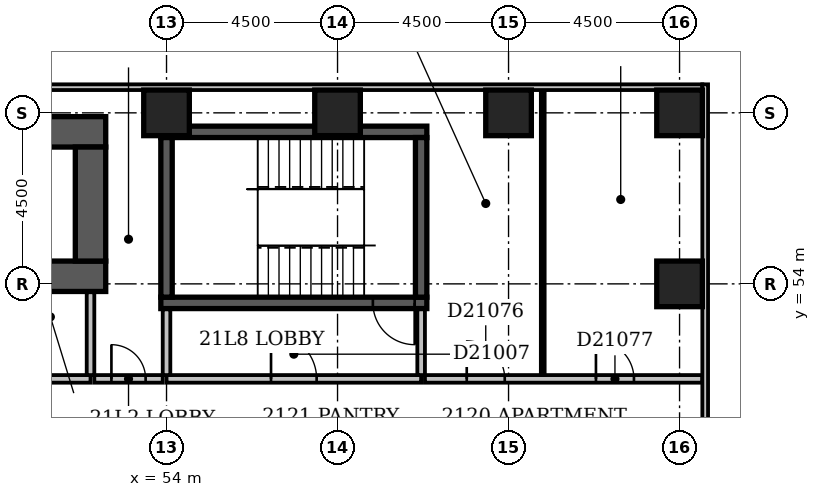
"""IFC4 building model, lengths in metres.
Left out: names, types, materials, properties, quantities, classifications, styles, units other than length and angle.
Written with IfcOpenShell. Run it as: python <this file> out.ifc"""

import sys

from ifc_helpers import new_model, si_unit, direction, frame, frame_2d, origin, origin_2d, place, context, subcontext, project, spatial, rectangle, extrude, element, fill, save


model = new_model("IFC4")
c1 = context("Model", 3, precision=1e-05, world=origin(), true_north=direction((0.0, 1.0)))
c2 = subcontext(c1, "Body", "Model", "MODEL_VIEW")
j1 = project(units=[si_unit("LENGTHUNIT", "METRE"), si_unit("PLANEANGLEUNIT", "RADIAN")], contexts=[c1])
p1 = place(None, origin())
s1 = spatial("IfcSite", under=j1, at=p1, CompositionType="ELEMENT")
p2 = place(p1, origin())
s2 = spatial("IfcBuilding", under=s1, at=p2, CompositionType="ELEMENT")
p3 = place(p2, frame((0.0, 0.0, 86.6)))
s3 = spatial("IfcBuildingStorey", under=s2, at=p3, CompositionType="ELEMENT", Elevation=86.6)
for number, where, z_axis, x_axis in (
    (1, (47.0, 54.2, -0.3), (0.0, 0.0, 1.0), (1.0, 0.0, 0.0)),
    (2, (47.0, 58.0, -0.3), (0.0, 0.0, 1.0), (1.0, 0.0, 0.0)),
):
    element("IfcWall", number, at=place(p3, frame(where, z_axis=z_axis, x_axis=x_axis)), inside=s3, PredefinedType="SHEAR", context=c2, shape_type="SweptSolid", body=[
        extrude(rectangle(XDim=5.4, YDim=0.8, at=frame_2d((2.7, 0.0))), origin(), (0.0, 0.0, 1.0), 3.6),
    ])
p4 = place(p3, frame((52.0, 54.6, -0.3), z_axis=(0.0, 0.0, 1.0), x_axis=(0.0, 1.0, 0.0)))
e3 = element("IfcWall", 3, at=p4, inside=s3, PredefinedType="SHEAR", context=c2, shape_type="SweptSolid", body=[
    extrude(rectangle(XDim=3.0, YDim=0.8, at=frame_2d((1.5, 0.0))), origin(), (0.0, 0.0, 1.0), 3.6),
])
p5 = place(p3, frame((53.85, 53.5, -0.3), z_axis=(0.0, 0.0, 1.0), x_axis=(1.0, 0.0, 0.0)))
e4 = element("IfcWall", 4, at=p5, inside=s3, PredefinedType="SHEAR", context=c2, shape_type="SweptSolid", body=[
    extrude(rectangle(XDim=7.0, YDim=0.3, at=frame_2d((3.5, 0.0))), origin(), (0.0, 0.0, 1.0), 3.6),
])
p6 = place(p5, frame((5.58, 0.0, 0.3)))
e5 = element("IfcOpeningElement", 5, at=p6, cuts=e4, PredefinedType="OPENING", context=c2, shape_type="SweptSolid", body=[
    extrude(rectangle(XDim=1.1, YDim=2.1, at=frame_2d((0.55, 1.05))), frame((0.0, 0.162, 0.0), z_axis=(0.0, -1.0, 0.0), x_axis=(1.0, 0.0, 0.0)), (0.0, 0.0, 1.0), 0.324),
])
p7 = place(p3, frame((53.85, 58.0, -0.3), z_axis=(0.0, 0.0, 1.0), x_axis=(1.0, 0.0, 0.0)))
e6 = element("IfcWall", 6, at=p7, inside=s3, PredefinedType="SHEAR", context=c2, shape_type="SweptSolid", body=[
    extrude(rectangle(XDim=7.0, YDim=0.3, at=frame_2d((3.5, 0.0))), origin(), (0.0, 0.0, 1.0), 3.6),
])
for number, where, z_axis, x_axis in (
    (7, (54.0, 53.65, -0.3), (0.0, 0.0, 1.0), (0.0, 1.0, 0.0)),
    (8, (60.7, 53.65, -0.3), (0.0, 0.0, 1.0), (0.0, 1.0, 0.0)),
):
    element("IfcWall", number, at=place(p3, frame(where, z_axis=z_axis, x_axis=x_axis)), inside=s3, PredefinedType="SHEAR", context=c2, shape_type="SweptSolid", body=[
        extrude(rectangle(XDim=4.2, YDim=0.3, at=frame_2d((2.1, 0.0))), origin(), (0.0, 0.0, 1.0), 3.6),
    ])
for number, where, z_axis, x_axis in (
    (9, (67.5, 54.0, -0.3), (0.0, 0.0, 1.0), (1.0, 0.0, 0.0)),
    (10, (54.0, 58.5, -0.3), (0.0, 0.0, 1.0), (1.0, 0.0, 0.0)),
    (11, (58.5, 58.5, -0.3), (0.0, 0.0, 1.0), (1.0, 0.0, 0.0)),
    (12, (63.0, 58.5, -0.3), (0.0, 0.0, 1.0), (1.0, 0.0, 0.0)),
    (13, (67.5, 58.5, -0.3), (0.0, 0.0, 1.0), (1.0, 0.0, 0.0)),
):
    element("IfcColumn", number, at=place(p3, frame(where, z_axis=z_axis, x_axis=x_axis)), inside=s3, PredefinedType="COLUMN", context=c2, shape_type="SweptSolid", body=[
        extrude(rectangle(XDim=1.2, YDim=1.2, at=origin_2d()), origin(), (0.0, 0.0, 1.0), 3.6),
    ])
p8 = place(p3, frame((68.175, 35.4, 0.0), z_axis=(0.0, 0.0, 1.0), x_axis=(0.0, 1.0, 0.0)))
e14 = element("IfcWall", 14, at=p8, inside=s3, PredefinedType="STANDARD", context=c2, shape_type="SweptSolid", body=[
    extrude(rectangle(XDim=23.85, YDim=0.15, at=frame_2d((11.925, 0.0))), origin(), (0.0, 0.0, 1.0), 2.7),
])
p9 = place(p8, frame((1.403, 0.0, 0.6)))
e15 = element("IfcOpeningElement", 15, at=p9, cuts=e14, PredefinedType="OPENING", context=c2, shape_type="SweptSolid", body=[
    extrude(rectangle(XDim=1.5, YDim=1.8, at=frame_2d((0.75, 0.9))), frame((0.0, 0.087, 0.0), z_axis=(0.0, -1.0, 0.0), x_axis=(1.0, 0.0, 0.0)), (0.0, 0.0, 1.0), 0.174),
])
p10 = place(p3, frame((68.1, 59.175, 0.0), z_axis=(0.0, 0.0, 1.0), x_axis=(-1.0, 0.0, 0.0)))
e16 = element("IfcWall", 16, at=p10, inside=s3, PredefinedType="STANDARD", context=c2, shape_type="SweptSolid", body=[
    extrude(rectangle(XDim=68.85, YDim=0.15, at=frame_2d((34.425, 0.0))), origin(), (0.0, 0.0, 1.0), 2.7),
])
p11 = place(p10, frame((37.65, 0.0, 0.6)))
e17 = element("IfcOpeningElement", 17, at=p11, cuts=e16, PredefinedType="OPENING", context=c2, shape_type="SweptSolid", body=[
    extrude(rectangle(XDim=2.4, YDim=1.8, at=frame_2d((1.2, 0.9))), frame((0.0, 0.087, 0.0), z_axis=(0.0, -1.0, 0.0), x_axis=(1.0, 0.0, 0.0)), (0.0, 0.0, 1.0), 0.174),
])
p12 = place(p3, frame((47.0, 51.5, 0.0), z_axis=(0.0, 0.0, 1.0), x_axis=(1.0, 0.0, 0.0)))
e18 = element("IfcWall", 18, at=p12, inside=s3, PredefinedType="PARTITIONING", context=c2, shape_type="SweptSolid", body=[
    extrude(rectangle(XDim=5.0, YDim=0.2, at=frame_2d((2.5, 0.0))), origin(), (0.0, 0.0, 1.0), 3.3),
])
p13 = place(p12, frame((1.9, 0.0, 0.0)))
e19 = element("IfcOpeningElement", 19, at=p13, cuts=e18, PredefinedType="OPENING", context=c2, shape_type="SweptSolid", body=[
    extrude(rectangle(XDim=1.2, YDim=2.1, at=frame_2d((0.6, 1.05))), frame((0.0, 0.112, 0.0), z_axis=(0.0, -1.0, 0.0), x_axis=(1.0, 0.0, 0.0)), (0.0, 0.0, 1.0), 0.224),
])
p14 = place(p3, frame((52.0, 51.6, 0.0), z_axis=(0.0, 0.0, 1.0), x_axis=(0.0, 1.0, 0.0)))
e20 = element("IfcWall", 20, at=p14, inside=s3, PredefinedType="PARTITIONING", context=c2, shape_type="SweptSolid", body=[
    extrude(rectangle(XDim=2.18, YDim=0.2, at=frame_2d((1.09, 0.0))), origin(), (0.0, 0.0, 1.0), 3.3),
])
p15 = place(p3, frame((54.0, 51.5, 0.0), z_axis=(0.0, 0.0, 1.0), x_axis=(1.0, 0.0, 0.0)))
e21 = element("IfcWall", 21, at=p15, inside=s3, PredefinedType="PARTITIONING", context=c2, shape_type="SweptSolid", body=[
    extrude(rectangle(XDim=6.7, YDim=0.2, at=frame_2d((3.35, 0.0))), origin(), (0.0, 0.0, 1.0), 3.3),
])
p16 = place(p15, frame((2.75, 0.0, 0.0)))
e22 = element("IfcOpeningElement", 22, at=p16, cuts=e21, PredefinedType="OPENING", context=c2, shape_type="SweptSolid", body=[
    extrude(rectangle(XDim=1.2, YDim=2.1, at=frame_2d((0.6, 1.05))), frame((0.0, 0.112, 0.0), z_axis=(0.0, -1.0, 0.0), x_axis=(1.0, 0.0, 0.0)), (0.0, 0.0, 1.0), 0.224),
])
p17 = place(p3, frame((60.7, 51.6, 0.0), z_axis=(0.0, 0.0, 1.0), x_axis=(0.0, 1.0, 0.0)))
e23 = element("IfcWall", 23, at=p17, inside=s3, PredefinedType="PARTITIONING", context=c2, shape_type="SweptSolid", body=[
    extrude(rectangle(XDim=1.73, YDim=0.2, at=frame_2d((0.865, 0.0))), origin(), (0.0, 0.0, 1.0), 3.3),
])
p18 = place(p3, frame((54.0, 51.6, 0.0), z_axis=(0.0, 0.0, 1.0), x_axis=(0.0, 1.0, 0.0)))
e24 = element("IfcWall", 24, at=p18, inside=s3, PredefinedType="PARTITIONING", context=c2, shape_type="SweptSolid", body=[
    extrude(rectangle(XDim=1.73, YDim=0.2, at=frame_2d((0.865, 0.0))), origin(), (0.0, 0.0, 1.0), 2.6),
])
p19 = place(p3, frame((52.1, 51.5, 0.0), z_axis=(0.0, 0.0, 1.0), x_axis=(1.0, 0.0, 0.0)))
e25 = element("IfcWall", 25, at=p19, inside=s3, PredefinedType="PARTITIONING", context=c2, shape_type="SweptSolid", body=[
    extrude(rectangle(XDim=1.8, YDim=0.2, at=frame_2d((0.9, 0.0))), origin(), (0.0, 0.0, 1.0), 3.3),
])
p20 = place(p19, frame((0.45, 0.0, 0.0)))
e26 = element("IfcOpeningElement", 26, at=p20, cuts=e25, PredefinedType="OPENING", context=c2, shape_type="SweptSolid", body=[
    extrude(rectangle(XDim=0.9, YDim=2.1, at=frame_2d((0.45, 1.05))), frame((0.0, 0.112, 0.0), z_axis=(0.0, -1.0, 0.0), x_axis=(1.0, 0.0, 0.0)), (0.0, 0.0, 1.0), 0.224),
])
p21 = place(p3, frame((60.8, 51.5, 0.0), z_axis=(0.0, 0.0, 1.0), x_axis=(1.0, 0.0, 0.0)))
e27 = element("IfcWall", 27, at=p21, inside=s3, PredefinedType="PARTITIONING", context=c2, shape_type="SweptSolid", body=[
    extrude(rectangle(XDim=7.3, YDim=0.2, at=frame_2d((3.65, 0.0))), origin(), (0.0, 0.0, 1.0), 3.3),
])
p22 = place(p21, frame((1.1, 0.0, 0.0)))
e28 = element("IfcOpeningElement", 28, at=p22, cuts=e27, PredefinedType="OPENING", context=c2, shape_type="SweptSolid", body=[
    extrude(rectangle(XDim=1.0, YDim=2.1, at=frame_2d((0.5, 1.05))), frame((0.0, 0.112, 0.0), z_axis=(0.0, -1.0, 0.0), x_axis=(1.0, 0.0, 0.0)), (0.0, 0.0, 1.0), 0.224),
])
p23 = place(p21, frame((4.5, 0.0, 0.0)))
e29 = element("IfcOpeningElement", 29, at=p23, cuts=e27, PredefinedType="OPENING", context=c2, shape_type="SweptSolid", body=[
    extrude(rectangle(XDim=1.0, YDim=2.1, at=frame_2d((0.5, 1.05))), frame((0.0, 0.112, 0.0), z_axis=(0.0, -1.0, 0.0), x_axis=(1.0, 0.0, 0.0)), (0.0, 0.0, 1.0), 0.224),
])
p24 = place(p3, frame((63.9, 51.6, 0.0), z_axis=(0.0, 0.0, 1.0), x_axis=(0.0, 1.0, 0.0)))
e30 = element("IfcWall", 30, at=p24, inside=s3, PredefinedType="PARTITIONING", context=c2, shape_type="SweptSolid", body=[
    extrude(rectangle(XDim=7.5, YDim=0.1, at=frame_2d((3.75, 0.0))), origin(), (0.0, 0.0, 1.0), 3.3),
])
p25 = place(p16, origin())
e31 = element("IfcDoor", 31, at=p25, inside=s3, OperationType="SINGLE_SWING_LEFT", PredefinedType="DOOR", context=c2, shape_type="SweptSolid", body=[
    extrude(rectangle(XDim=1.2, YDim=2.1, at=frame_2d((0.6, 1.05))), frame((0.0, 0.025, 0.0), z_axis=(0.0, -1.0, 0.0), x_axis=(1.0, 0.0, 0.0)), (0.0, 0.0, 1.0), 0.05),
])
fill(e22, e31)
p26 = place(p6, origin())
e32 = element("IfcDoor", 32, at=p26, inside=s3, OperationType="SINGLE_SWING_RIGHT", PredefinedType="DOOR", context=c2, shape_type="SweptSolid", body=[
    extrude(rectangle(XDim=1.1, YDim=2.1, at=frame_2d((0.55, 1.05))), frame((0.0, 0.025, 0.0), z_axis=(0.0, -1.0, 0.0), x_axis=(1.0, 0.0, 0.0)), (0.0, 0.0, 1.0), 0.05),
])
fill(e5, e32)
p27 = place(p20, origin())
e33 = element("IfcDoor", 33, at=p27, inside=s3, OperationType="SINGLE_SWING_LEFT", PredefinedType="DOOR", context=c2, shape_type="SweptSolid", body=[
    extrude(rectangle(XDim=0.9, YDim=2.1, at=frame_2d((0.45, 1.05))), frame((0.0, 0.025, 0.0), z_axis=(0.0, -1.0, 0.0), x_axis=(1.0, 0.0, 0.0)), (0.0, 0.0, 1.0), 0.05),
])
fill(e26, e33)
p28 = place(p22, origin())
e34 = element("IfcDoor", 34, at=p28, inside=s3, OperationType="SINGLE_SWING_LEFT", PredefinedType="DOOR", context=c2, shape_type="SweptSolid", body=[
    extrude(rectangle(XDim=1.0, YDim=2.1, at=frame_2d((0.5, 1.05))), frame((0.0, 0.025, 0.0), z_axis=(0.0, -1.0, 0.0), x_axis=(1.0, 0.0, 0.0)), (0.0, 0.0, 1.0), 0.05),
])
fill(e28, e34)
p29 = place(p23, origin())
e35 = element("IfcDoor", 35, at=p29, inside=s3, OperationType="SINGLE_SWING_LEFT", PredefinedType="DOOR", context=c2, shape_type="SweptSolid", body=[
    extrude(rectangle(XDim=1.0, YDim=2.1, at=frame_2d((0.5, 1.05))), frame((0.0, 0.025, 0.0), z_axis=(0.0, -1.0, 0.0), x_axis=(1.0, 0.0, 0.0)), (0.0, 0.0, 1.0), 0.05),
])
fill(e29, e35)
save(model, sys.argv[1])
